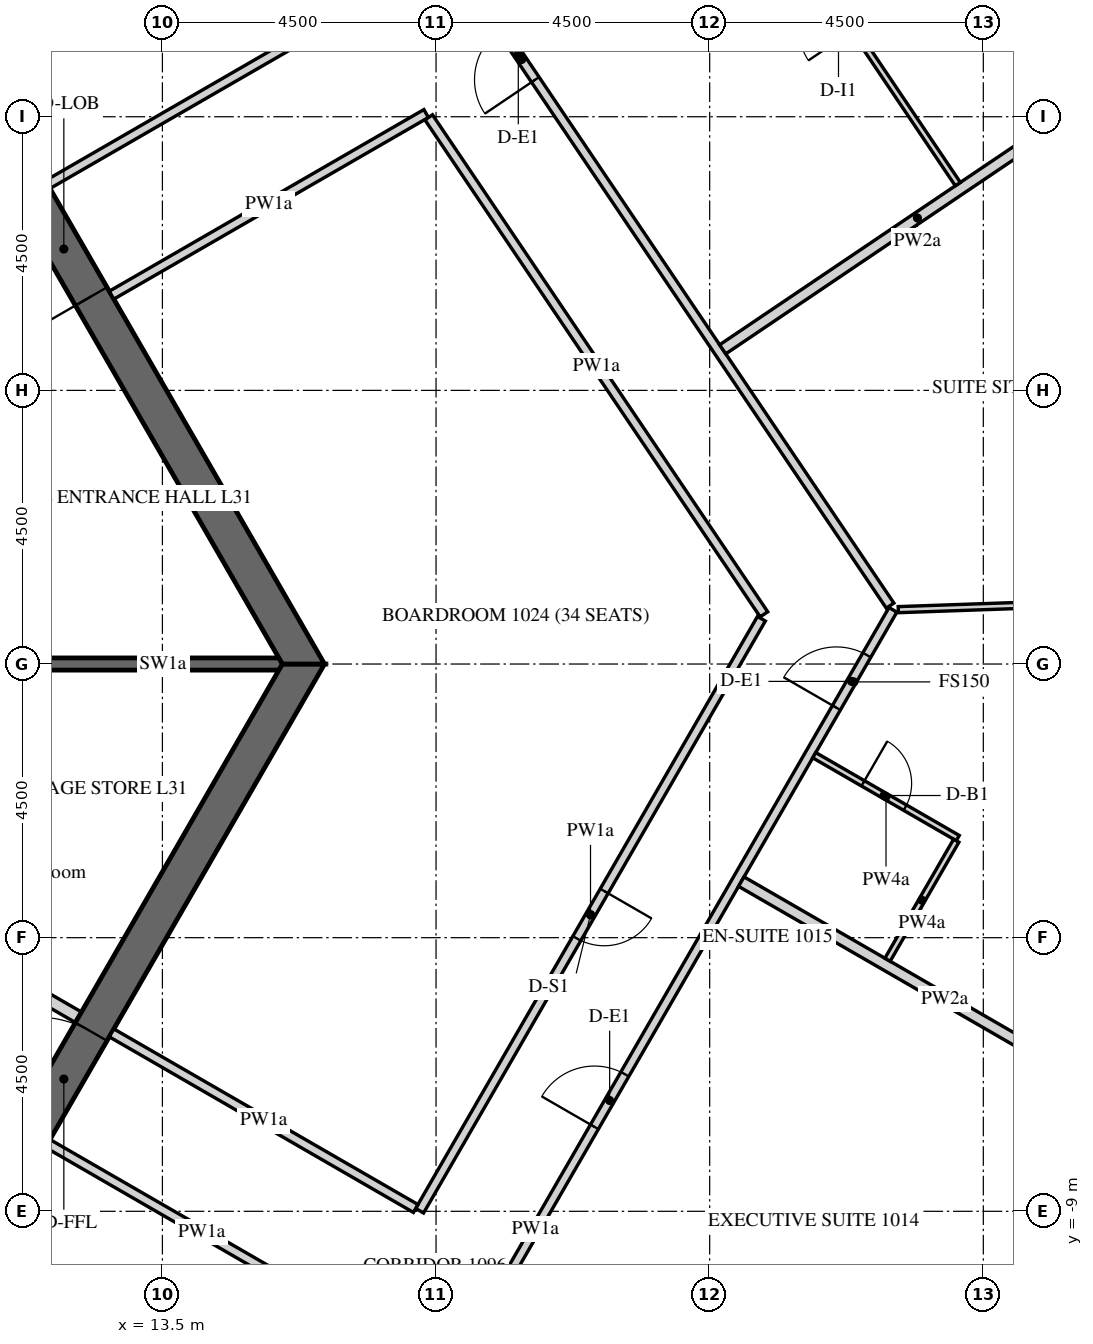
"""IFC4 building model, lengths in metres.
Left out: names, types, materials, properties, quantities, classifications, styles, units other than length and angle.
Written with IfcOpenShell. Run it as: python <this file> out.ifc"""

import sys

from ifc_helpers import new_model, si_unit, direction, frame, frame_2d, origin, place, context, subcontext, project, spatial, polyline, rectangle, outline, extrude, element, fill, save


model = new_model("IFC4")
c1 = context("Model", 3, precision=1e-05, world=origin(), true_north=direction((0.0, 1.0)))
c2 = subcontext(c1, "Body", "Model", "MODEL_VIEW")
j1 = project(units=[si_unit("LENGTHUNIT", "METRE"), si_unit("PLANEANGLEUNIT", "RADIAN")], contexts=[c1])
p1 = place(None, origin())
s1 = spatial("IfcSite", under=j1, at=p1, CompositionType="ELEMENT")
p2 = place(p1, origin())
s2 = spatial("IfcBuilding", under=s1, at=p2, CompositionType="ELEMENT")
p3 = place(p2, frame((0.0, 0.0, 135.0)))
s3 = spatial("IfcBuildingStorey", under=s2, at=p3, CompositionType="ELEMENT", Elevation=135.0)
p4 = place(p3, frame((18.83, -26.835, -0.15), z_axis=(0.0, 0.0, 1.0), x_axis=(0.500003800416, 0.866023209602, 0.0)))
e1 = element("IfcWall", 1, at=p4, inside=s3, PredefinedType="SOLIDWALL", context=c2, shape_type="SweptSolid", body=[
    extrude(outline(polyline([(-0.022, -0.275), (30.097, -0.275), (30.045, 0.275), (0.022, 0.275), (-0.022, -0.275)])), origin(), (0.0, 0.0, 1.0), 3.9),
])
p5 = place(p4, frame((1.236, 0.0, 1.05)))
e2 = element("IfcOpeningElement", 2, at=p5, cuts=e1, PredefinedType="OPENING", context=c2, shape_type="SweptSolid", body=[
    extrude(rectangle(XDim=2.4, YDim=2.4, at=frame_2d((1.2, 1.2))), frame((0.0, 0.285, 0.0), z_axis=(0.0, -1.0, 0.0), x_axis=(1.0, 0.0, 0.0)), (0.0, 0.0, 1.0), 0.57),
])
p6 = place(p4, frame((4.835, 0.0, 1.05)))
e3 = element("IfcOpeningElement", 3, at=p6, cuts=e1, PredefinedType="OPENING", context=c2, shape_type="SweptSolid", body=[
    extrude(rectangle(XDim=2.4, YDim=2.4, at=frame_2d((1.2, 1.2))), frame((0.0, 0.285, 0.0), z_axis=(0.0, -1.0, 0.0), x_axis=(1.0, 0.0, 0.0)), (0.0, 0.0, 1.0), 0.57),
])
p7 = place(p4, frame((8.436, 0.0, 1.05)))
e4 = element("IfcOpeningElement", 4, at=p7, cuts=e1, PredefinedType="OPENING", context=c2, shape_type="SweptSolid", body=[
    extrude(rectangle(XDim=2.4, YDim=2.4, at=frame_2d((1.2, 1.2))), frame((0.0, 0.285, 0.0), z_axis=(0.0, -1.0, 0.0), x_axis=(1.0, 0.0, 0.0)), (0.0, 0.0, 1.0), 0.57),
])
p8 = place(p4, frame((12.035, 0.0, 1.05)))
e5 = element("IfcOpeningElement", 5, at=p8, cuts=e1, PredefinedType="OPENING", context=c2, shape_type="SweptSolid", body=[
    extrude(rectangle(XDim=2.4, YDim=2.4, at=frame_2d((1.2, 1.2))), frame((0.0, 0.285, 0.0), z_axis=(0.0, -1.0, 0.0), x_axis=(1.0, 0.0, 0.0)), (0.0, 0.0, 1.0), 0.57),
])
p9 = place(p4, frame((15.635, 0.0, 1.05)))
e6 = element("IfcOpeningElement", 6, at=p9, cuts=e1, PredefinedType="OPENING", context=c2, shape_type="SweptSolid", body=[
    extrude(rectangle(XDim=2.4, YDim=2.4, at=frame_2d((1.2, 1.2))), frame((0.0, 0.285, 0.0), z_axis=(0.0, -1.0, 0.0), x_axis=(1.0, 0.0, 0.0)), (0.0, 0.0, 1.0), 0.57),
])
p10 = place(p4, frame((19.236, 0.0, 1.05)))
e7 = element("IfcOpeningElement", 7, at=p10, cuts=e1, PredefinedType="OPENING", context=c2, shape_type="SweptSolid", body=[
    extrude(rectangle(XDim=2.4, YDim=2.4, at=frame_2d((1.2, 1.2))), frame((0.0, 0.285, 0.0), z_axis=(0.0, -1.0, 0.0), x_axis=(1.0, 0.0, 0.0)), (0.0, 0.0, 1.0), 0.57),
])
p11 = place(p4, frame((22.835, 0.0, 1.05)))
e8 = element("IfcOpeningElement", 8, at=p11, cuts=e1, PredefinedType="OPENING", context=c2, shape_type="SweptSolid", body=[
    extrude(rectangle(XDim=2.4, YDim=2.4, at=frame_2d((1.2, 1.2))), frame((0.0, 0.285, 0.0), z_axis=(0.0, -1.0, 0.0), x_axis=(1.0, 0.0, 0.0)), (0.0, 0.0, 1.0), 0.57),
])
p12 = place(p4, frame((26.436, 0.0, 1.05)))
e9 = element("IfcOpeningElement", 9, at=p12, cuts=e1, PredefinedType="OPENING", context=c2, shape_type="SweptSolid", body=[
    extrude(rectangle(XDim=2.4, YDim=2.4, at=frame_2d((1.2, 1.2))), frame((0.0, 0.285, 0.0), z_axis=(0.0, -1.0, 0.0), x_axis=(1.0, 0.0, 0.0)), (0.0, 0.0, 1.0), 0.57),
])
p13 = place(p3, frame((33.728, 3.153, -0.15), z_axis=(0.0, 0.0, 1.0), x_axis=(-0.559192411416, 0.82903790445, 0.0)))
e10 = element("IfcWall", 10, at=p13, inside=s3, PredefinedType="SOLIDWALL", context=c2, shape_type="SweptSolid", body=[
    extrude(outline(polyline([(-0.026, -0.275), (30.093, -0.275), (30.048, 0.275), (0.026, 0.275), (-0.026, -0.275)])), origin(), (0.0, 0.0, 1.0), 3.9),
])
p14 = place(p13, frame((1.236, 0.0, 1.05)))
e11 = element("IfcOpeningElement", 11, at=p14, cuts=e10, PredefinedType="OPENING", context=c2, shape_type="SweptSolid", body=[
    extrude(rectangle(XDim=2.4, YDim=2.4, at=frame_2d((1.2, 1.2))), frame((0.0, 0.285, 0.0), z_axis=(0.0, -1.0, 0.0), x_axis=(1.0, 0.0, 0.0)), (0.0, 0.0, 1.0), 0.57),
])
p15 = place(p13, frame((4.835, 0.0, 1.05)))
e12 = element("IfcOpeningElement", 12, at=p15, cuts=e10, PredefinedType="OPENING", context=c2, shape_type="SweptSolid", body=[
    extrude(rectangle(XDim=2.4, YDim=2.4, at=frame_2d((1.2, 1.2))), frame((0.0, 0.285, 0.0), z_axis=(0.0, -1.0, 0.0), x_axis=(1.0, 0.0, 0.0)), (0.0, 0.0, 1.0), 0.57),
])
p16 = place(p13, frame((8.436, 0.0, 1.05)))
e13 = element("IfcOpeningElement", 13, at=p16, cuts=e10, PredefinedType="OPENING", context=c2, shape_type="SweptSolid", body=[
    extrude(rectangle(XDim=2.4, YDim=2.4, at=frame_2d((1.2, 1.2))), frame((0.0, 0.285, 0.0), z_axis=(0.0, -1.0, 0.0), x_axis=(1.0, 0.0, 0.0)), (0.0, 0.0, 1.0), 0.57),
])
p17 = place(p13, frame((12.035, 0.0, 1.05)))
e14 = element("IfcOpeningElement", 14, at=p17, cuts=e10, PredefinedType="OPENING", context=c2, shape_type="SweptSolid", body=[
    extrude(rectangle(XDim=2.4, YDim=2.4, at=frame_2d((1.2, 1.2))), frame((0.0, 0.285, 0.0), z_axis=(0.0, -1.0, 0.0), x_axis=(1.0, 0.0, 0.0)), (0.0, 0.0, 1.0), 0.57),
])
p18 = place(p13, frame((15.635, 0.0, 1.05)))
e15 = element("IfcOpeningElement", 15, at=p18, cuts=e10, PredefinedType="OPENING", context=c2, shape_type="SweptSolid", body=[
    extrude(rectangle(XDim=2.4, YDim=2.4, at=frame_2d((1.2, 1.2))), frame((0.0, 0.285, 0.0), z_axis=(0.0, -1.0, 0.0), x_axis=(1.0, 0.0, 0.0)), (0.0, 0.0, 1.0), 0.57),
])
p19 = place(p13, frame((19.236, 0.0, 1.05)))
e16 = element("IfcOpeningElement", 16, at=p19, cuts=e10, PredefinedType="OPENING", context=c2, shape_type="SweptSolid", body=[
    extrude(rectangle(XDim=2.4, YDim=2.4, at=frame_2d((1.2, 1.2))), frame((0.0, 0.285, 0.0), z_axis=(0.0, -1.0, 0.0), x_axis=(1.0, 0.0, 0.0)), (0.0, 0.0, 1.0), 0.57),
])
p20 = place(p13, frame((22.835, 0.0, 1.05)))
e17 = element("IfcOpeningElement", 17, at=p20, cuts=e10, PredefinedType="OPENING", context=c2, shape_type="SweptSolid", body=[
    extrude(rectangle(XDim=2.4, YDim=2.4, at=frame_2d((1.2, 1.2))), frame((0.0, 0.285, 0.0), z_axis=(0.0, -1.0, 0.0), x_axis=(1.0, 0.0, 0.0)), (0.0, 0.0, 1.0), 0.57),
])
p21 = place(p13, frame((26.436, 0.0, 1.05)))
e18 = element("IfcOpeningElement", 18, at=p21, cuts=e10, PredefinedType="OPENING", context=c2, shape_type="SweptSolid", body=[
    extrude(rectangle(XDim=2.4, YDim=2.4, at=frame_2d((1.2, 1.2))), frame((0.0, 0.285, 0.0), z_axis=(0.0, -1.0, 0.0), x_axis=(1.0, 0.0, 0.0)), (0.0, 0.0, 1.0), 0.57),
])
p22 = place(p3, frame((7.91, -13.7, -0.15), z_axis=(0.0, 0.0, 1.0), x_axis=(0.499999880136, 0.866025472988, 0.0)))
e19 = element("IfcWall", 19, at=p22, inside=s3, PredefinedType="SHEAR", context=c2, shape_type="SweptSolid", body=[
    extrude(outline(polyline([(-0.173, -0.3), (15.993, -0.3), (15.646, 0.3), (0.173, 0.3), (-0.173, -0.3)])), origin(), (0.0, 0.0, 1.0), 3.9),
])
p23 = place(p22, frame((7.039, 0.0, 0.15)))
e20 = element("IfcOpeningElement", 20, at=p23, cuts=e19, PredefinedType="OPENING", context=c2, shape_type="SweptSolid", body=[
    extrude(rectangle(XDim=1.8, YDim=2.4, at=frame_2d((0.9, 1.2))), frame((0.0, 0.31, 0.0), z_axis=(0.0, -1.0, 0.0), x_axis=(1.0, 0.0, 0.0)), (0.0, 0.0, 1.0), 0.62),
])
p24 = place(p3, frame((15.819, 0.0, -0.15), z_axis=(0.0, 0.0, 1.0), x_axis=(-0.499999880136, 0.866025472988, 0.0)))
e21 = element("IfcWall", 21, at=p24, inside=s3, PredefinedType="SHEAR", context=c2, shape_type="SweptSolid", body=[
    extrude(outline(polyline([(-0.173, -0.3), (15.993, -0.3), (15.646, 0.3), (0.173, 0.3), (-0.173, -0.3)])), origin(), (0.0, 0.0, 1.0), 3.9),
])
p25 = place(p24, frame((6.981, 0.0, 0.15)))
e22 = element("IfcOpeningElement", 22, at=p25, cuts=e21, PredefinedType="OPENING", context=c2, shape_type="SweptSolid", body=[
    extrude(rectangle(XDim=1.8, YDim=2.4, at=frame_2d((0.9, 1.2))), frame((0.0, 0.31, 0.0), z_axis=(0.0, -1.0, 0.0), x_axis=(1.0, 0.0, 0.0)), (0.0, 0.0, 1.0), 0.62),
])
p26 = place(p3, frame((11.547, 0.0, -0.15), z_axis=(0.0, 0.0, 1.0), x_axis=(1.0, 0.0, 0.0)))
e23 = element("IfcWall", 23, at=p26, inside=s3, PredefinedType="SHEAR", context=c2, shape_type="SweptSolid", body=[
    extrude(rectangle(XDim=3.926, YDim=0.2, at=frame_2d((1.963, 0.0))), origin(), (0.0, 0.0, 1.0), 3.9),
])
p27 = place(p3, frame((9.175, -4.109, 0.0), z_axis=(0.0, 0.0, 1.0), x_axis=(0.865989465428, -0.500062241894, 0.0)))
e24 = element("IfcWall", 24, at=p27, inside=s3, PredefinedType="PARTITIONING", context=c2, shape_type="SweptSolid", body=[
    extrude(rectangle(XDim=3.4, YDim=0.2, at=frame_2d((1.7, 0.0))), origin(), (0.0, 0.0, 1.0), 3.65),
])
p28 = place(p27, frame((1.351, 0.0, 0.0)))
e25 = element("IfcOpeningElement", 25, at=p28, cuts=e24, PredefinedType="OPENING", context=c2, shape_type="SweptSolid", body=[
    extrude(rectangle(XDim=0.9, YDim=2.1, at=frame_2d((0.45, 1.05))), frame((0.0, 0.11, 0.0), z_axis=(0.0, -1.0, 0.0), x_axis=(1.0, 0.0, 0.0)), (0.0, 0.0, 1.0), 0.22),
])
p29 = place(p3, frame((13.755, -19.475, 0.0), z_axis=(0.0, 0.0, 1.0), x_axis=(0.50000013933, 0.866025323342, 0.0)))
e26 = element("IfcWall", 26, at=p29, inside=s3, PredefinedType="PARTITIONING", context=c2, shape_type="SweptSolid", body=[
    extrude(rectangle(XDim=23.517, YDim=0.15, at=frame_2d((11.758, 0.0))), origin(), (0.0, 0.0, 1.0), 2.838),
])
p30 = place(p29, frame((4.456, 0.0, 0.0)))
e27 = element("IfcOpeningElement", 27, at=p30, cuts=e26, PredefinedType="OPENING", context=c2, shape_type="SweptSolid", body=[
    extrude(rectangle(XDim=1.0, YDim=2.1, at=frame_2d((0.5, 1.05))), frame((0.0, 0.085, 0.0), z_axis=(0.0, -1.0, 0.0), x_axis=(1.0, 0.0, 0.0)), (0.0, 0.0, 1.0), 0.17),
])
p31 = place(p29, frame((13.699, 0.0, 0.0)))
e28 = element("IfcOpeningElement", 28, at=p31, cuts=e26, PredefinedType="OPENING", context=c2, shape_type="SweptSolid", body=[
    extrude(rectangle(XDim=1.0, YDim=2.1, at=frame_2d((0.5, 1.05))), frame((0.0, 0.085, 0.0), z_axis=(0.0, -1.0, 0.0), x_axis=(1.0, 0.0, 0.0)), (0.0, 0.0, 1.0), 0.17),
])
p32 = place(p29, frame((21.658, 0.0, 0.0)))
e29 = element("IfcOpeningElement", 29, at=p32, cuts=e26, PredefinedType="OPENING", context=c2, shape_type="SweptSolid", body=[
    extrude(rectangle(XDim=1.0, YDim=2.1, at=frame_2d((0.5, 1.05))), frame((0.0, 0.085, 0.0), z_axis=(0.0, -1.0, 0.0), x_axis=(1.0, 0.0, 0.0)), (0.0, 0.0, 1.0), 0.17),
])
p33 = place(p3, frame((25.467, 0.96, 0.0), z_axis=(0.0, 0.0, 1.0), x_axis=(-0.559200743185, 0.829032284547, 0.0)))
e30 = element("IfcWall", 30, at=p33, inside=s3, PredefinedType="PARTITIONING", context=c2, shape_type="SweptSolid", body=[
    extrude(rectangle(XDim=21.668, YDim=0.15, at=frame_2d((10.834, 0.0))), origin(), (0.0, 0.0, 1.0), 2.838),
])
p34 = place(p33, frame((10.434, 0.0, 0.0)))
e31 = element("IfcOpeningElement", 31, at=p34, cuts=e30, PredefinedType="OPENING", context=c2, shape_type="SweptSolid", body=[
    extrude(rectangle(XDim=1.0, YDim=2.1, at=frame_2d((0.5, 1.05))), frame((0.0, 0.085, 0.0), z_axis=(0.0, -1.0, 0.0), x_axis=(1.0, 0.0, 0.0)), (0.0, 0.0, 1.0), 0.17),
])
p35 = place(p3, frame((12.664, 6.066, 0.0), z_axis=(0.0, 0.0, 1.0), x_axis=(0.866018848283, 0.500011354289, 0.0)))
e32 = element("IfcWall", 32, at=p35, inside=s3, PredefinedType="PARTITIONING", context=c2, shape_type="SweptSolid", body=[
    extrude(rectangle(XDim=5.974, YDim=0.15, at=frame_2d((2.987, 0.0))), origin(), (0.0, 0.0, 1.0), 2.838),
])
p36 = place(p3, frame((17.879, 8.99, 0.0), z_axis=(0.0, 0.0, 1.0), x_axis=(0.559189565351, -0.829039824136, 0.0)))
e33 = element("IfcWall", 33, at=p36, inside=s3, PredefinedType="PARTITIONING", context=c2, shape_type="SweptSolid", body=[
    extrude(rectangle(XDim=9.859, YDim=0.15, at=frame_2d((4.929, 0.0))), origin(), (0.0, 0.0, 1.0), 2.838),
])
p37 = place(p3, frame((23.351, 0.745, 0.0), z_axis=(0.0, 0.0, 1.0), x_axis=(-0.500009458068, -0.866019943097, 0.0)))
e34 = element("IfcWall", 34, at=p37, inside=s3, PredefinedType="PARTITIONING", context=c2, shape_type="SweptSolid", body=[
    extrude(rectangle(XDim=11.241, YDim=0.15, at=frame_2d((5.621, 0.0))), origin(), (0.0, 0.0, 1.0), 2.838),
])
p38 = place(p37, frame((5.171, 0.0, 0.0)))
e35 = element("IfcOpeningElement", 35, at=p38, cuts=e34, PredefinedType="OPENING", context=c2, shape_type="SweptSolid", body=[
    extrude(rectangle(XDim=0.9, YDim=2.1, at=frame_2d((0.45, 1.05))), frame((0.0, 0.085, 0.0), z_axis=(0.0, -1.0, 0.0), x_axis=(1.0, 0.0, 0.0)), (0.0, 0.0, 1.0), 0.17),
])
p39 = place(p3, frame((17.665, -8.953, 0.0), z_axis=(0.0, 0.0, 1.0), x_axis=(-0.866025774745, 0.499999357477, 0.0)))
e36 = element("IfcWall", 36, at=p39, inside=s3, PredefinedType="PARTITIONING", context=c2, shape_type="SweptSolid", body=[
    extrude(rectangle(XDim=5.775, YDim=0.15, at=frame_2d((2.887, 0.0))), origin(), (0.0, 0.0, 1.0), 2.838),
])
p40 = place(p3, frame((11.614, -7.884, 0.0), z_axis=(0.0, 0.0, 1.0), x_axis=(0.866018092707, -0.500012662943, 0.0)))
e37 = element("IfcWall", 37, at=p40, inside=s3, PredefinedType="PARTITIONING", context=c2, shape_type="SweptSolid", body=[
    extrude(rectangle(XDim=5.85, YDim=0.15, at=frame_2d((2.925, 0.0))), origin(), (0.0, 0.0, 1.0), 2.838),
])
p41 = place(p3, frame((16.595, 10.76, 0.0), z_axis=(0.0, 0.0, 1.0), x_axis=(-0.866019477104, -0.500010265171, 0.0)))
e38 = element("IfcWall", 38, at=p41, inside=s3, PredefinedType="PARTITIONING", context=c2, shape_type="SweptSolid", body=[
    extrude(rectangle(XDim=5.752, YDim=0.15, at=frame_2d((2.876, 0.0))), origin(), (0.0, 0.0, 1.0), 2.838),
])
p42 = place(p3, frame((29.71, -7.441, 0.0), z_axis=(0.0, 0.0, 1.0), x_axis=(-0.866019273868, 0.500010617176, 0.0)))
e39 = element("IfcWall", 39, at=p42, inside=s3, PredefinedType="PARTITIONING", context=c2, shape_type="SweptSolid", body=[
    extrude(rectangle(XDim=7.725, YDim=0.18, at=frame_2d((3.862, 0.0))), origin(), (0.0, 0.0, 1.0), 2.838),
])
p43 = place(p3, frame((24.22, -1.5, 0.0), z_axis=(0.0, 0.0, 1.0), x_axis=(0.866012511928, -0.500022328685, 0.0)))
e40 = element("IfcWall", 40, at=p43, inside=s3, PredefinedType="PARTITIONING", context=c2, shape_type="SweptSolid", body=[
    extrude(rectangle(XDim=2.725, YDim=0.1, at=frame_2d((1.363, 0.0))), origin(), (0.0, 0.0, 1.0), 2.838),
])
p44 = place(p43, frame((0.925, 0.0, 0.0)))
e41 = element("IfcOpeningElement", 41, at=p44, cuts=e40, PredefinedType="OPENING", context=c2, shape_type="SweptSolid", body=[
    extrude(rectangle(XDim=0.8, YDim=2.1, at=frame_2d((0.4, 1.05))), frame((0.0, 0.06, 0.0), z_axis=(0.0, -1.0, 0.0), x_axis=(1.0, 0.0, 0.0)), (0.0, 0.0, 1.0), 0.12),
])
p45 = place(p3, frame((26.555, -2.906, 0.0), z_axis=(0.0, 0.0, 1.0), x_axis=(-0.500077800282, -0.865980481111, 0.0)))
e42 = element("IfcWall", 42, at=p45, inside=s3, PredefinedType="PARTITIONING", context=c2, shape_type="SweptSolid", body=[
    extrude(rectangle(XDim=2.26, YDim=0.1, at=frame_2d((1.13, 0.0))), origin(), (0.0, 0.0, 1.0), 2.838),
])
p46 = place(p3, frame((34.023, 1.188, 0.0), z_axis=(0.0, 0.0, 1.0), x_axis=(-0.999390379298, -0.03491231539, 0.0)))
e43 = element("IfcWall", 43, at=p46, inside=s3, PredefinedType="PARTITIONING", context=c2, shape_type="SweptSolid", body=[
    extrude(rectangle(XDim=8.427, YDim=0.1, at=frame_2d((4.213, 0.0))), origin(), (0.0, 0.0, 1.0), 2.838),
])
p47 = place(p46, frame((3.808, 0.0, 0.0)))
e44 = element("IfcOpeningElement", 44, at=p47, cuts=e43, PredefinedType="OPENING", context=c2, shape_type="SweptSolid", body=[
    extrude(rectangle(XDim=0.9, YDim=2.1, at=frame_2d((0.45, 1.05))), frame((0.0, 0.06, 0.0), z_axis=(0.0, -1.0, 0.0), x_axis=(1.0, 0.0, 0.0)), (0.0, 0.0, 1.0), 0.12),
])
p48 = place(p3, frame((29.119, 9.495, 0.0), z_axis=(0.0, 0.0, 1.0), x_axis=(-0.82903328576, -0.559199258853, 0.0)))
e45 = element("IfcWall", 45, at=p48, inside=s3, PredefinedType="PARTITIONING", context=c2, shape_type="SweptSolid", body=[
    extrude(rectangle(XDim=7.725, YDim=0.18, at=frame_2d((3.863, 0.0))), origin(), (0.0, 0.0, 1.0), 2.838),
])
p49 = place(p3, frame((26.581, 7.892, 0.0), z_axis=(0.0, 0.0, 1.0), x_axis=(-0.559185029686, 0.829042883435, 0.0)))
e46 = element("IfcWall", 46, at=p49, inside=s3, PredefinedType="PARTITIONING", context=c2, shape_type="SweptSolid", body=[
    extrude(rectangle(XDim=7.11, YDim=0.1, at=frame_2d((3.555, 0.0))), origin(), (0.0, 0.0, 1.0), 2.838),
])
p50 = place(p49, frame((3.06, 0.0, 0.0)))
e47 = element("IfcOpeningElement", 47, at=p50, cuts=e46, PredefinedType="OPENING", context=c2, shape_type="SweptSolid", body=[
    extrude(rectangle(XDim=0.9, YDim=2.1, at=frame_2d((0.45, 1.05))), frame((0.0, 0.06, 0.0), z_axis=(0.0, -1.0, 0.0), x_axis=(1.0, 0.0, 0.0)), (0.0, 0.0, 1.0), 0.12),
])
p51 = place(p16, frame((0.0, 0.205, 0.0)))
e48 = element("IfcWindow", 48, at=p51, inside=s3, PartitioningType="DOUBLE_PANEL_VERTICAL", PredefinedType="WINDOW", context=c2, shape_type="SweptSolid", body=[
    extrude(rectangle(XDim=2.4, YDim=2.4, at=frame_2d((1.2, 1.2))), frame((0.0, 0.03, 0.0), z_axis=(0.0, -1.0, 0.0), x_axis=(1.0, 0.0, 0.0)), (0.0, 0.0, 1.0), 0.06),
])
fill(e13, e48)
p52 = place(p25, origin())
e49 = element("IfcDoor", 49, at=p52, inside=s3, OperationType="DOUBLE_DOOR_SINGLE_SWING", PredefinedType="DOOR", context=c2, shape_type="SweptSolid", body=[
    extrude(rectangle(XDim=1.8, YDim=2.4, at=frame_2d((0.9, 1.2))), frame((0.0, 0.025, 0.0), z_axis=(0.0, -1.0, 0.0), x_axis=(1.0, 0.0, 0.0)), (0.0, 0.0, 1.0), 0.05),
])
fill(e22, e49)
p53 = place(p23, origin())
e50 = element("IfcDoor", 50, at=p53, inside=s3, OperationType="DOUBLE_DOOR_SINGLE_SWING", PredefinedType="DOOR", context=c2, shape_type="SweptSolid", body=[
    extrude(rectangle(XDim=1.8, YDim=2.4, at=frame_2d((0.9, 1.2))), frame((0.0, 0.025, 0.0), z_axis=(0.0, -1.0, 0.0), x_axis=(1.0, 0.0, 0.0)), (0.0, 0.0, 1.0), 0.05),
])
fill(e20, e50)
p54 = place(p31, origin())
e51 = element("IfcDoor", 51, at=p54, inside=s3, OperationType="SINGLE_SWING_RIGHT", PredefinedType="DOOR", context=c2, shape_type="SweptSolid", body=[
    extrude(rectangle(XDim=1.0, YDim=2.1, at=frame_2d((0.5, 1.05))), frame((0.0, 0.025, 0.0), z_axis=(0.0, -1.0, 0.0), x_axis=(1.0, 0.0, 0.0)), (0.0, 0.0, 1.0), 0.05),
])
fill(e28, e51)
p55 = place(p32, origin())
e52 = element("IfcDoor", 52, at=p55, inside=s3, OperationType="SINGLE_SWING_RIGHT", PredefinedType="DOOR", context=c2, shape_type="SweptSolid", body=[
    extrude(rectangle(XDim=1.0, YDim=2.1, at=frame_2d((0.5, 1.05))), frame((0.0, 0.025, 0.0), z_axis=(0.0, -1.0, 0.0), x_axis=(1.0, 0.0, 0.0)), (0.0, 0.0, 1.0), 0.05),
])
fill(e29, e52)
p56 = place(p44, origin())
e53 = element("IfcDoor", 53, at=p56, inside=s3, OperationType="SINGLE_SWING_RIGHT", PredefinedType="DOOR", context=c2, shape_type="SweptSolid", body=[
    extrude(rectangle(XDim=0.8, YDim=2.1, at=frame_2d((0.4, 1.05))), frame((0.0, 0.025, 0.0), z_axis=(0.0, -1.0, 0.0), x_axis=(1.0, 0.0, 0.0)), (0.0, 0.0, 1.0), 0.05),
])
fill(e41, e53)
p57 = place(p34, origin())
e54 = element("IfcDoor", 54, at=p57, inside=s3, OperationType="SINGLE_SWING_RIGHT", PredefinedType="DOOR", context=c2, shape_type="SweptSolid", body=[
    extrude(rectangle(XDim=1.0, YDim=2.1, at=frame_2d((0.5, 1.05))), frame((0.0, 0.025, 0.0), z_axis=(0.0, -1.0, 0.0), x_axis=(1.0, 0.0, 0.0)), (0.0, 0.0, 1.0), 0.05),
])
fill(e31, e54)
p58 = place(p38, origin())
e55 = element("IfcDoor", 55, at=p58, inside=s3, OperationType="SINGLE_SWING_LEFT", PredefinedType="DOOR", context=c2, shape_type="SweptSolid", body=[
    extrude(rectangle(XDim=0.9, YDim=2.1, at=frame_2d((0.45, 1.05))), frame((0.0, 0.025, 0.0), z_axis=(0.0, -1.0, 0.0), x_axis=(1.0, 0.0, 0.0)), (0.0, 0.0, 1.0), 0.05),
])
fill(e35, e55)
save(model, sys.argv[1])
